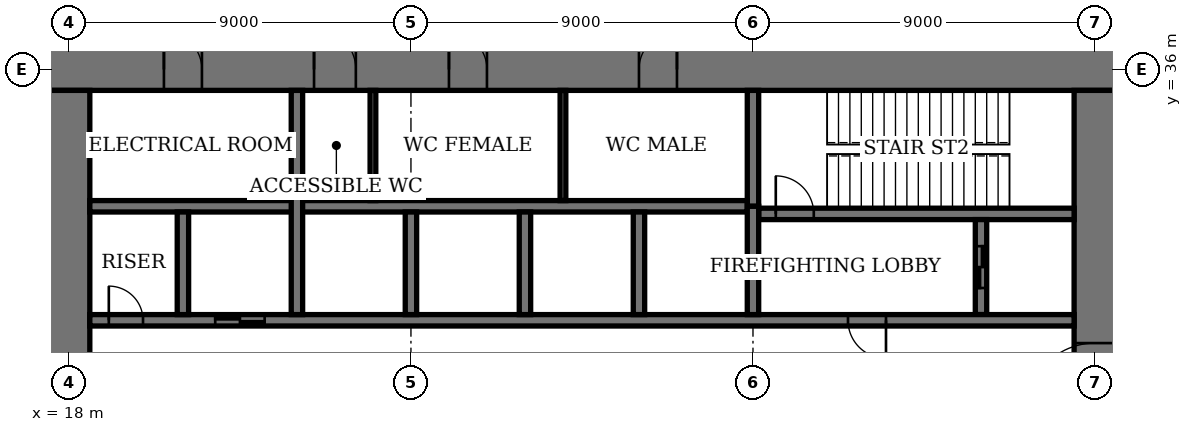
"""IFC4 building model, lengths in metres.
Left out: names, types, materials, properties, quantities, classifications, styles, units other than length and angle.
Written with IfcOpenShell. Run it as: python <this file> out.ifc"""

import sys

from ifc_helpers import new_model, si_unit, direction, frame, frame_2d, origin, place, context, subcontext, project, spatial, rectangle, extrude, element, fill, save


model = new_model("IFC4")
c1 = context("Model", 3, precision=1e-05, world=origin(), true_north=direction((0.0, 1.0)))
c2 = subcontext(c1, "Body", "Model", "MODEL_VIEW")
j1 = project(units=[si_unit("LENGTHUNIT", "METRE"), si_unit("PLANEANGLEUNIT", "RADIAN")], contexts=[c1])
p1 = place(None, origin())
s1 = spatial("IfcSite", under=j1, at=p1, CompositionType="ELEMENT")
p2 = place(p1, origin())
s2 = spatial("IfcBuilding", under=s1, at=p2, CompositionType="ELEMENT")
p3 = place(p2, frame((0.0, 0.0, 10.8)))
s3 = spatial("IfcBuildingStorey", under=s2, at=p3, CompositionType="ELEMENT", Elevation=10.8)
p4 = place(p3, frame((45.55, 36.0, 0.0), z_axis=(0.0, 0.0, 1.0), x_axis=(-1.0, 0.0, 0.0)))
e1 = element("IfcWall", 1, at=p4, inside=s3, PredefinedType="SHEAR", context=c2, shape_type="SweptSolid", body=[
    extrude(rectangle(XDim=28.1, YDim=1.1, at=frame_2d((14.05, 0.0))), origin(), (0.0, 0.0, 1.0), 5.0),
])
p5 = place(p4, frame((11.55, 0.0, 0.0)))
e2 = element("IfcOpeningElement", 2, at=p5, cuts=e1, PredefinedType="OPENING", context=c2, shape_type="SweptSolid", body=[
    extrude(rectangle(XDim=1.0, YDim=2.4, at=frame_2d((0.5, 1.2))), frame((0.0, 0.56, 0.0), z_axis=(0.0, -1.0, 0.0), x_axis=(1.0, 0.0, 0.0)), (0.0, 0.0, 1.0), 1.12),
])
p6 = place(p4, frame((16.55, 0.0, 0.0)))
e3 = element("IfcOpeningElement", 3, at=p6, cuts=e1, PredefinedType="OPENING", context=c2, shape_type="SweptSolid", body=[
    extrude(rectangle(XDim=1.0, YDim=2.4, at=frame_2d((0.5, 1.2))), frame((0.0, 0.56, 0.0), z_axis=(0.0, -1.0, 0.0), x_axis=(1.0, 0.0, 0.0)), (0.0, 0.0, 1.0), 1.12),
])
p7 = place(p4, frame((20.0, 0.0, 0.0)))
e4 = element("IfcOpeningElement", 4, at=p7, cuts=e1, PredefinedType="OPENING", context=c2, shape_type="SweptSolid", body=[
    extrude(rectangle(XDim=1.1, YDim=2.4, at=frame_2d((0.55, 1.2))), frame((0.0, 0.56, 0.0), z_axis=(0.0, -1.0, 0.0), x_axis=(1.0, 0.0, 0.0)), (0.0, 0.0, 1.0), 1.12),
])
p8 = place(p4, frame((24.05, 0.0, 0.0)))
e5 = element("IfcOpeningElement", 5, at=p8, cuts=e1, PredefinedType="OPENING", context=c2, shape_type="SweptSolid", body=[
    extrude(rectangle(XDim=1.0, YDim=2.4, at=frame_2d((0.5, 1.2))), frame((0.0, 0.56, 0.0), z_axis=(0.0, -1.0, 0.0), x_axis=(1.0, 0.0, 0.0)), (0.0, 0.0, 1.0), 1.12),
])
p9 = place(p3, frame((18.0, 35.45, 0.0), z_axis=(0.0, 0.0, 1.0), x_axis=(0.0, -1.0, 0.0)))
e6 = element("IfcWall", 6, at=p9, inside=s3, PredefinedType="SHEAR", context=c2, shape_type="SweptSolid", body=[
    extrude(rectangle(XDim=16.9, YDim=1.1, at=frame_2d((8.45, 0.0))), origin(), (0.0, 0.0, 1.0), 5.0),
])
p10 = place(p9, frame((8.45, 0.0, 0.0)))
e7 = element("IfcOpeningElement", 7, at=p10, cuts=e6, PredefinedType="OPENING", context=c2, shape_type="SweptSolid", body=[
    extrude(rectangle(XDim=1.8, YDim=2.4, at=frame_2d((0.9, 1.2))), frame((0.0, 0.56, 0.0), z_axis=(0.0, -1.0, 0.0), x_axis=(1.0, 0.0, 0.0)), (0.0, 0.0, 1.0), 1.12),
])
p11 = place(p3, frame((45.0, 18.55, 0.0), z_axis=(0.0, 0.0, 1.0), x_axis=(0.0, 1.0, 0.0)))
e8 = element("IfcWall", 8, at=p11, inside=s3, PredefinedType="SHEAR", context=c2, shape_type="SweptSolid", body=[
    extrude(rectangle(XDim=16.9, YDim=1.1, at=frame_2d((8.45, 0.0))), origin(), (0.0, 0.0, 1.0), 5.0),
])
p12 = place(p11, frame((8.45, 0.0, 0.0)))
e9 = element("IfcOpeningElement", 9, at=p12, cuts=e8, PredefinedType="OPENING", context=c2, shape_type="SweptSolid", body=[
    extrude(rectangle(XDim=1.8, YDim=2.4, at=frame_2d((0.9, 1.2))), frame((0.0, 0.56, 0.0), z_axis=(0.0, -1.0, 0.0), x_axis=(1.0, 0.0, 0.0)), (0.0, 0.0, 1.0), 1.12),
])
p13 = place(p3, frame((36.15, 32.2, 0.0), z_axis=(0.0, 0.0, 1.0), x_axis=(1.0, 0.0, 0.0)))
e10 = element("IfcWall", 10, at=p13, inside=s3, PredefinedType="SHEAR", context=c2, shape_type="SweptSolid", body=[
    extrude(rectangle(XDim=8.3, YDim=0.3, at=frame_2d((4.15, 0.0))), origin(), (0.0, 0.0, 1.0), 5.0),
])
p14 = place(p13, frame((0.45, 0.0, 0.0)))
e11 = element("IfcOpeningElement", 11, at=p14, cuts=e10, PredefinedType="OPENING", context=c2, shape_type="SweptSolid", body=[
    extrude(rectangle(XDim=1.0, YDim=2.4, at=frame_2d((0.5, 1.2))), frame((0.0, 0.16, 0.0), z_axis=(0.0, -1.0, 0.0), x_axis=(1.0, 0.0, 0.0)), (0.0, 0.0, 1.0), 0.32),
])
p15 = place(p3, frame((36.0, 32.4, 0.0), z_axis=(0.0, 0.0, 1.0), x_axis=(0.0, 1.0, 0.0)))
e12 = element("IfcWall", 12, at=p15, inside=s3, PredefinedType="SHEAR", context=c2, shape_type="SweptSolid", body=[
    extrude(rectangle(XDim=3.05, YDim=0.3, at=frame_2d((1.525, 0.0))), origin(), (0.0, 0.0, 1.0), 5.0),
])
p16 = place(p3, frame((42.0, 29.55, 0.0), z_axis=(0.0, 0.0, 1.0), x_axis=(0.0, 1.0, 0.0)))
e13 = element("IfcWall", 13, at=p16, inside=s3, PredefinedType="SHEAR", context=c2, shape_type="SweptSolid", body=[
    extrude(rectangle(XDim=2.5, YDim=0.3, at=frame_2d((1.25, 0.0))), origin(), (0.0, 0.0, 1.0), 5.0),
])
p17 = place(p16, frame((0.7, 0.0, 0.0)))
e14 = element("IfcOpeningElement", 14, at=p17, cuts=e13, PredefinedType="OPENING", context=c2, shape_type="SweptSolid", body=[
    extrude(rectangle(XDim=1.1, YDim=2.4, at=frame_2d((0.55, 1.2))), frame((0.0, 0.16, 0.0), z_axis=(0.0, -1.0, 0.0), x_axis=(1.0, 0.0, 0.0)), (0.0, 0.0, 1.0), 0.32),
])
p18 = place(p3, frame((18.55, 29.4, 0.0), z_axis=(0.0, 0.0, 1.0), x_axis=(1.0, 0.0, 0.0)))
e15 = element("IfcWall", 15, at=p18, inside=s3, PredefinedType="SHEAR", context=c2, shape_type="SweptSolid", body=[
    extrude(rectangle(XDim=25.9, YDim=0.3, at=frame_2d((12.95, 0.0))), origin(), (0.0, 0.0, 1.0), 5.0),
])
p19 = place(p18, frame((19.95, 0.0, 0.0)))
e16 = element("IfcOpeningElement", 16, at=p19, cuts=e15, PredefinedType="OPENING", context=c2, shape_type="SweptSolid", body=[
    extrude(rectangle(XDim=1.0, YDim=2.4, at=frame_2d((0.5, 1.2))), frame((0.0, 0.16, 0.0), z_axis=(0.0, -1.0, 0.0), x_axis=(1.0, 0.0, 0.0)), (0.0, 0.0, 1.0), 0.32),
])
p20 = place(p18, frame((0.5, 0.0, 0.0)))
e17 = element("IfcOpeningElement", 17, at=p20, cuts=e15, PredefinedType="OPENING", context=c2, shape_type="SweptSolid", body=[
    extrude(rectangle(XDim=0.9, YDim=2.1, at=frame_2d((0.45, 1.05))), frame((0.0, 0.16, 0.0), z_axis=(0.0, -1.0, 0.0), x_axis=(1.0, 0.0, 0.0)), (0.0, 0.0, 1.0), 0.32),
])
p21 = place(p18, frame((3.3, 0.0, 0.0)))
e18 = element("IfcOpeningElement", 18, at=p21, cuts=e15, PredefinedType="OPENING", context=c2, shape_type="SweptSolid", body=[
    extrude(rectangle(XDim=1.3, YDim=2.4, at=frame_2d((0.65, 1.2))), frame((0.0, 0.16, 0.0), z_axis=(0.0, -1.0, 0.0), x_axis=(1.0, 0.0, 0.0)), (0.0, 0.0, 1.0), 0.32),
])
p22 = place(p3, frame((18.55, 32.4, 0.0), z_axis=(0.0, 0.0, 1.0), x_axis=(1.0, 0.0, 0.0)))
e19 = element("IfcWall", 19, at=p22, inside=s3, PredefinedType="SHEAR", context=c2, shape_type="SweptSolid", body=[
    extrude(rectangle(XDim=17.3, YDim=0.3, at=frame_2d((8.65, 0.0))), origin(), (0.0, 0.0, 1.0), 5.0),
])
for number, where, z_axis, x_axis in (
    (20, (33.0, 29.55, 0.0), (0.0, 0.0, 1.0), (0.0, 1.0, 0.0)),
    (21, (30.0, 29.55, 0.0), (0.0, 0.0, 1.0), (0.0, 1.0, 0.0)),
    (22, (27.0, 29.55, 0.0), (0.0, 0.0, 1.0), (0.0, 1.0, 0.0)),
):
    element("IfcWall", number, at=place(p3, frame(where, z_axis=z_axis, x_axis=x_axis)), inside=s3, PredefinedType="SHEAR", context=c2, shape_type="SweptSolid", body=[
        extrude(rectangle(XDim=2.7, YDim=0.3, at=frame_2d((1.35, 0.0))), origin(), (0.0, 0.0, 1.0), 5.0),
    ])
p23 = place(p3, frame((24.0, 29.55, 0.0), z_axis=(0.0, 0.0, 1.0), x_axis=(0.0, 1.0, 0.0)))
e23 = element("IfcWall", 23, at=p23, inside=s3, PredefinedType="SHEAR", context=c2, shape_type="SweptSolid", body=[
    extrude(rectangle(XDim=5.9, YDim=0.3, at=frame_2d((2.95, 0.0))), origin(), (0.0, 0.0, 1.0), 5.0),
])
p24 = place(p3, frame((21.0, 29.55, 0.0), z_axis=(0.0, 0.0, 1.0), x_axis=(0.0, 1.0, 0.0)))
e24 = element("IfcWall", 24, at=p24, inside=s3, PredefinedType="SHEAR", context=c2, shape_type="SweptSolid", body=[
    extrude(rectangle(XDim=2.7, YDim=0.3, at=frame_2d((1.35, 0.0))), origin(), (0.0, 0.0, 1.0), 5.0),
])
p25 = place(p3, frame((36.0, 29.55, 0.0), z_axis=(0.0, 0.0, 1.0), x_axis=(0.0, 1.0, 0.0)))
e25 = element("IfcWall", 25, at=p25, inside=s3, PredefinedType="SHEAR", context=c2, shape_type="SweptSolid", body=[
    extrude(rectangle(XDim=2.85, YDim=0.3, at=frame_2d((1.425, 0.0))), origin(), (0.0, 0.0, 1.0), 5.0),
])
for number, where, z_axis, x_axis in (
    (26, (31.0, 32.55, 0.0), (0.0, 0.0, 1.0), (0.0, 1.0, 0.0)),
    (27, (26.0, 32.55, 0.0), (0.0, 0.0, 1.0), (0.0, 1.0, 0.0)),
):
    element("IfcWall", number, at=place(p3, frame(where, z_axis=z_axis, x_axis=x_axis)), inside=s3, PredefinedType="PARTITIONING", context=c2, shape_type="SweptSolid", body=[
        extrude(rectangle(XDim=2.9, YDim=0.15, at=frame_2d((1.45, 0.0))), origin(), (0.0, 0.0, 1.0), 4.6),
    ])
p26 = place(p12, origin())
e28 = element("IfcDoor", 28, at=p26, inside=s3, OperationType="DOUBLE_DOOR_DOUBLE_SWING", PredefinedType="DOOR", context=c2, shape_type="SweptSolid", body=[
    extrude(rectangle(XDim=1.8, YDim=2.4, at=frame_2d((0.9, 1.2))), frame((0.0, 0.03, 0.0), z_axis=(0.0, -1.0, 0.0), x_axis=(1.0, 0.0, 0.0)), (0.0, 0.0, 1.0), 0.06),
    extrude(rectangle(XDim=0.04, YDim=2.4, at=frame_2d((0.02, 1.2))), frame((0.0, 0.55, 0.0), z_axis=(0.0, -1.0, 0.0), x_axis=(1.0, 0.0, 0.0)), (0.0, 0.0, 1.0), 1.1),
    extrude(rectangle(XDim=0.04, YDim=2.4, at=frame_2d((1.78, 1.2))), frame((0.0, 0.55, 0.0), z_axis=(0.0, -1.0, 0.0), x_axis=(1.0, 0.0, 0.0)), (0.0, 0.0, 1.0), 1.1),
    extrude(rectangle(XDim=1.8, YDim=0.04, at=frame_2d((0.9, 2.38))), frame((0.0, 0.55, 0.0), z_axis=(0.0, -1.0, 0.0), x_axis=(1.0, 0.0, 0.0)), (0.0, 0.0, 1.0), 1.1),
])
fill(e9, e28)
p27 = place(p5, origin())
e29 = element("IfcDoor", 29, at=p27, inside=s3, OperationType="SINGLE_SWING_LEFT", PredefinedType="DOOR", context=c2, shape_type="SweptSolid", body=[
    extrude(rectangle(XDim=1.0, YDim=2.4, at=frame_2d((0.5, 1.2))), frame((0.0, 0.025, 0.0), z_axis=(0.0, -1.0, 0.0), x_axis=(1.0, 0.0, 0.0)), (0.0, 0.0, 1.0), 0.05),
    extrude(rectangle(XDim=0.04, YDim=2.4, at=frame_2d((0.02, 1.2))), frame((0.0, 0.4, 0.0), z_axis=(0.0, -1.0, 0.0), x_axis=(1.0, 0.0, 0.0)), (0.0, 0.0, 1.0), 0.8),
    extrude(rectangle(XDim=0.04, YDim=2.4, at=frame_2d((0.98, 1.2))), frame((0.0, 0.4, 0.0), z_axis=(0.0, -1.0, 0.0), x_axis=(1.0, 0.0, 0.0)), (0.0, 0.0, 1.0), 0.8),
    extrude(rectangle(XDim=1.0, YDim=0.04, at=frame_2d((0.5, 2.38))), frame((0.0, 0.4, 0.0), z_axis=(0.0, -1.0, 0.0), x_axis=(1.0, 0.0, 0.0)), (0.0, 0.0, 1.0), 0.8),
])
fill(e2, e29)
p28 = place(p6, origin())
e30 = element("IfcDoor", 30, at=p28, inside=s3, OperationType="SINGLE_SWING_RIGHT", PredefinedType="DOOR", context=c2, shape_type="SweptSolid", body=[
    extrude(rectangle(XDim=1.0, YDim=2.4, at=frame_2d((0.5, 1.2))), frame((0.0, 0.025, 0.0), z_axis=(0.0, -1.0, 0.0), x_axis=(1.0, 0.0, 0.0)), (0.0, 0.0, 1.0), 0.05),
    extrude(rectangle(XDim=0.04, YDim=2.4, at=frame_2d((0.02, 1.2))), frame((0.0, 0.4, 0.0), z_axis=(0.0, -1.0, 0.0), x_axis=(1.0, 0.0, 0.0)), (0.0, 0.0, 1.0), 0.8),
    extrude(rectangle(XDim=0.04, YDim=2.4, at=frame_2d((0.98, 1.2))), frame((0.0, 0.4, 0.0), z_axis=(0.0, -1.0, 0.0), x_axis=(1.0, 0.0, 0.0)), (0.0, 0.0, 1.0), 0.8),
    extrude(rectangle(XDim=1.0, YDim=0.04, at=frame_2d((0.5, 2.38))), frame((0.0, 0.4, 0.0), z_axis=(0.0, -1.0, 0.0), x_axis=(1.0, 0.0, 0.0)), (0.0, 0.0, 1.0), 0.8),
])
fill(e3, e30)
p29 = place(p7, origin())
e31 = element("IfcDoor", 31, at=p29, inside=s3, OperationType="SINGLE_SWING_RIGHT", PredefinedType="DOOR", context=c2, shape_type="SweptSolid", body=[
    extrude(rectangle(XDim=1.1, YDim=2.4, at=frame_2d((0.55, 1.2))), frame((0.0, 0.025, 0.0), z_axis=(0.0, -1.0, 0.0), x_axis=(1.0, 0.0, 0.0)), (0.0, 0.0, 1.0), 0.05),
    extrude(rectangle(XDim=0.04, YDim=2.4, at=frame_2d((0.02, 1.2))), frame((0.0, 0.44, 0.0), z_axis=(0.0, -1.0, 0.0), x_axis=(1.0, 0.0, 0.0)), (0.0, 0.0, 1.0), 0.88),
    extrude(rectangle(XDim=0.04, YDim=2.4, at=frame_2d((1.08, 1.2))), frame((0.0, 0.44, 0.0), z_axis=(0.0, -1.0, 0.0), x_axis=(1.0, 0.0, 0.0)), (0.0, 0.0, 1.0), 0.88),
    extrude(rectangle(XDim=1.1, YDim=0.04, at=frame_2d((0.55, 2.38))), frame((0.0, 0.44, 0.0), z_axis=(0.0, -1.0, 0.0), x_axis=(1.0, 0.0, 0.0)), (0.0, 0.0, 1.0), 0.88),
])
fill(e4, e31)
p30 = place(p8, origin())
e32 = element("IfcDoor", 32, at=p30, inside=s3, OperationType="SINGLE_SWING_RIGHT", PredefinedType="DOOR", context=c2, shape_type="SweptSolid", body=[
    extrude(rectangle(XDim=1.0, YDim=2.4, at=frame_2d((0.5, 1.2))), frame((0.0, 0.025, 0.0), z_axis=(0.0, -1.0, 0.0), x_axis=(1.0, 0.0, 0.0)), (0.0, 0.0, 1.0), 0.05),
    extrude(rectangle(XDim=0.04, YDim=2.4, at=frame_2d((0.02, 1.2))), frame((0.0, 0.4, 0.0), z_axis=(0.0, -1.0, 0.0), x_axis=(1.0, 0.0, 0.0)), (0.0, 0.0, 1.0), 0.8),
    extrude(rectangle(XDim=0.04, YDim=2.4, at=frame_2d((0.98, 1.2))), frame((0.0, 0.4, 0.0), z_axis=(0.0, -1.0, 0.0), x_axis=(1.0, 0.0, 0.0)), (0.0, 0.0, 1.0), 0.8),
    extrude(rectangle(XDim=1.0, YDim=0.04, at=frame_2d((0.5, 2.38))), frame((0.0, 0.4, 0.0), z_axis=(0.0, -1.0, 0.0), x_axis=(1.0, 0.0, 0.0)), (0.0, 0.0, 1.0), 0.8),
])
fill(e5, e32)
p31 = place(p14, origin())
e33 = element("IfcDoor", 33, at=p31, inside=s3, OperationType="SINGLE_SWING_RIGHT", PredefinedType="DOOR", context=c2, shape_type="SweptSolid", body=[
    extrude(rectangle(XDim=1.0, YDim=2.4, at=frame_2d((0.5, 1.2))), frame((0.0, 0.03, 0.0), z_axis=(0.0, -1.0, 0.0), x_axis=(1.0, 0.0, 0.0)), (0.0, 0.0, 1.0), 0.06),
])
fill(e11, e33)
p32 = place(p19, origin())
e34 = element("IfcDoor", 34, at=p32, inside=s3, OperationType="SINGLE_SWING_RIGHT", PredefinedType="DOOR", context=c2, shape_type="SweptSolid", body=[
    extrude(rectangle(XDim=1.0, YDim=2.4, at=frame_2d((0.5, 1.2))), frame((0.0, 0.03, 0.0), z_axis=(0.0, -1.0, 0.0), x_axis=(1.0, 0.0, 0.0)), (0.0, 0.0, 1.0), 0.06),
])
fill(e16, e34)
p33 = place(p20, origin())
e35 = element("IfcDoor", 35, at=p33, inside=s3, OperationType="SINGLE_SWING_RIGHT", PredefinedType="DOOR", context=c2, shape_type="SweptSolid", body=[
    extrude(rectangle(XDim=0.9, YDim=2.1, at=frame_2d((0.45, 1.05))), frame((0.0, 0.03, 0.0), z_axis=(0.0, -1.0, 0.0), x_axis=(1.0, 0.0, 0.0)), (0.0, 0.0, 1.0), 0.06),
])
fill(e17, e35)
p34 = place(p21, origin())
e36 = element("IfcDoor", 36, at=p34, inside=s3, OperationType="DOUBLE_DOOR_SLIDING", PredefinedType="DOOR", context=c2, shape_type="SweptSolid", body=[
    extrude(rectangle(XDim=1.3, YDim=2.4, at=frame_2d((0.65, 1.2))), frame((0.0, 0.02, 0.0), z_axis=(0.0, -1.0, 0.0), x_axis=(1.0, 0.0, 0.0)), (0.0, 0.0, 1.0), 0.04),
])
fill(e18, e36)
p35 = place(p17, origin())
e37 = element("IfcDoor", 37, at=p35, inside=s3, OperationType="DOUBLE_DOOR_SLIDING", PredefinedType="DOOR", context=c2, shape_type="SweptSolid", body=[
    extrude(rectangle(XDim=1.1, YDim=2.4, at=frame_2d((0.55, 1.2))), frame((0.0, 0.03, 0.0), z_axis=(0.0, -1.0, 0.0), x_axis=(1.0, 0.0, 0.0)), (0.0, 0.0, 1.0), 0.06),
])
fill(e14, e37)
save(model, sys.argv[1])
